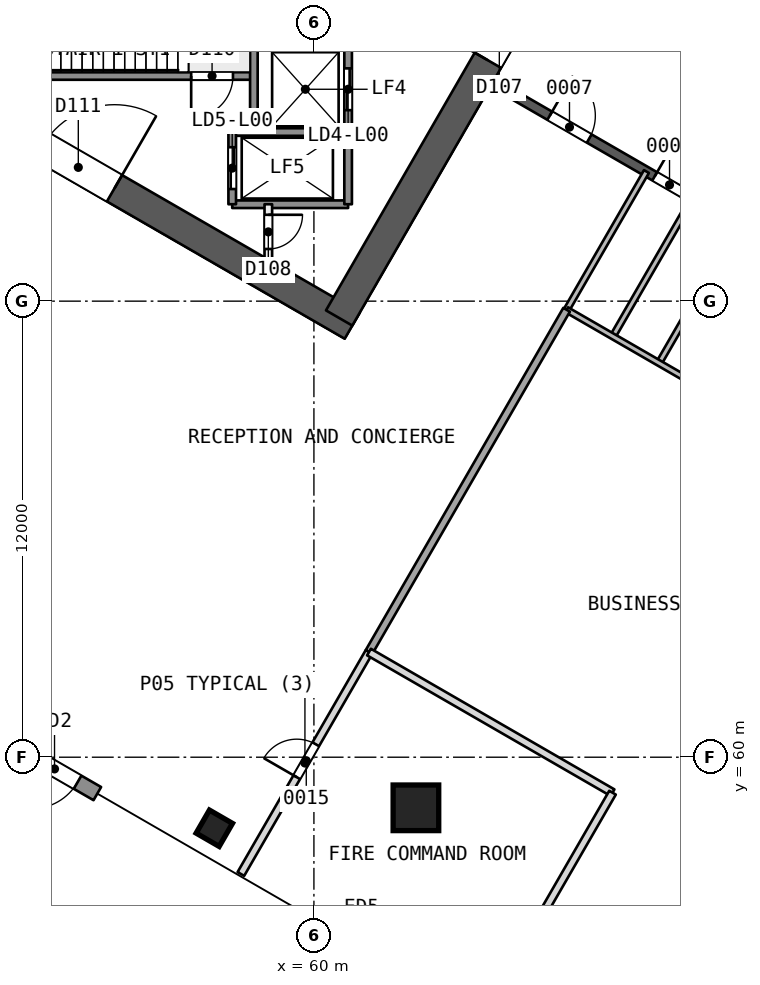
"""IFC4 building model, lengths in metres.
Left out: names, types, materials, properties, quantities, classifications, styles, units other than length and angle.
Written with IfcOpenShell. Run it as: python <this file> out.ifc"""

import sys

from ifc_helpers import new_model, si_unit, direction, frame, frame_2d, origin, origin_2d, place, context, subcontext, project, spatial, rectangle, extrude, element, fill, save


model = new_model("IFC4")
c1 = context("Model", 3, precision=1e-05, world=origin(), true_north=direction((0.0, 1.0)))
c2 = subcontext(c1, "Body", "Model", "MODEL_VIEW")
j1 = project(units=[si_unit("LENGTHUNIT", "METRE"), si_unit("PLANEANGLEUNIT", "RADIAN")], contexts=[c1])
p1 = place(None, origin())
s1 = spatial("IfcSite", under=j1, at=p1, CompositionType="ELEMENT")
p2 = place(p1, origin())
s2 = spatial("IfcBuilding", under=s1, at=p2, CompositionType="ELEMENT")
p3 = place(p2, origin())
s3 = spatial("IfcBuildingStorey", under=s2, at=p3, CompositionType="ELEMENT", Elevation=0.0)
p4 = place(p3, frame((48.797, 78.408, 0.0), z_axis=(0.0, 0.0, 1.0), x_axis=(0.866032504327, -0.499987701298, 0.0)))
e1 = element("IfcWall", 1, at=p4, inside=s3, PredefinedType="SHEAR", context=c2, shape_type="SweptSolid", body=[
    extrude(rectangle(XDim=14.102, YDim=0.8, at=frame_2d((7.051, 0.0))), origin(), (0.0, 0.0, 1.0), 9.0),
])
p5 = place(p4, frame((4.677, 0.0, 0.0)))
e2 = element("IfcOpeningElement", 2, at=p5, cuts=e1, PredefinedType="OPENING", context=c2, shape_type="SweptSolid", body=[
    extrude(rectangle(XDim=2.2, YDim=2.1, at=frame_2d((1.1, 1.05))), frame((0.0, 0.411, 0.0), z_axis=(0.0, -1.0, 0.0), x_axis=(1.0, 0.0, 0.0)), (0.0, 0.0, 1.0), 0.821),
])
p6 = place(p3, frame((60.664, 71.557, 0.0), z_axis=(0.0, 0.0, 1.0), x_axis=(0.50000409368, 0.866023040284, 0.0)))
e3 = element("IfcWall", 3, at=p6, inside=s3, PredefinedType="SHEAR", context=c2, shape_type="SweptSolid", body=[
    extrude(rectangle(XDim=9.98, YDim=0.8, at=frame_2d((4.99, 0.0))), origin(), (0.0, 0.0, 1.0), 9.0),
])
p7 = place(p6, frame((7.83, 0.0, 0.0)))
e4 = element("IfcOpeningElement", 4, at=p7, cuts=e3, PredefinedType="OPENING", context=c2, shape_type="SweptSolid", body=[
    extrude(rectangle(XDim=1.2, YDim=2.1, at=frame_2d((0.6, 1.05))), frame((0.0, 0.411, 0.0), z_axis=(0.0, -1.0, 0.0), x_axis=(1.0, 0.0, 0.0)), (0.0, 0.0, 1.0), 0.821),
])
p8 = place(p3, frame((64.7, 77.748, 0.0), z_axis=(0.0, 0.0, 1.0), x_axis=(0.866026492143, -0.499998114903, 0.0)))
e5 = element("IfcWall", 5, at=p8, inside=s3, PredefinedType="SHEAR", context=c2, shape_type="SweptSolid", body=[
    extrude(rectangle(XDim=15.588, YDim=0.25, at=frame_2d((7.794, 0.0))), origin(), (0.0, 0.0, 1.0), 8.6),
])
p9 = place(p8, frame((1.738, 0.0, 0.0)))
e6 = element("IfcOpeningElement", 6, at=p9, cuts=e5, PredefinedType="OPENING", context=c2, shape_type="SweptSolid", body=[
    extrude(rectangle(XDim=1.2, YDim=2.4, at=frame_2d((0.6, 1.2))), frame((0.0, 0.135, 0.0), z_axis=(0.0, -1.0, 0.0), x_axis=(1.0, 0.0, 0.0)), (0.0, 0.0, 1.0), 0.271),
])
p10 = place(p8, frame((4.928, 0.0, 0.0)))
e7 = element("IfcOpeningElement", 7, at=p10, cuts=e5, PredefinedType="OPENING", context=c2, shape_type="SweptSolid", body=[
    extrude(rectangle(XDim=0.9, YDim=2.1, at=frame_2d((0.45, 1.05))), frame((0.0, 0.135, 0.0), z_axis=(0.0, -1.0, 0.0), x_axis=(1.0, 0.0, 0.0)), (0.0, 0.0, 1.0), 0.271),
])
p11 = place(p8, frame((6.331, 0.0, 0.0)))
e8 = element("IfcOpeningElement", 8, at=p11, cuts=e5, PredefinedType="OPENING", context=c2, shape_type="SweptSolid", body=[
    extrude(rectangle(XDim=0.9, YDim=2.1, at=frame_2d((0.45, 1.05))), frame((0.0, 0.135, 0.0), z_axis=(0.0, -1.0, 0.0), x_axis=(1.0, 0.0, 0.0)), (0.0, 0.0, 1.0), 0.271),
])
p12 = place(p8, frame((7.968, 0.0, 0.0)))
e9 = element("IfcOpeningElement", 9, at=p12, cuts=e5, PredefinedType="OPENING", context=c2, shape_type="SweptSolid", body=[
    extrude(rectangle(XDim=0.9, YDim=2.1, at=frame_2d((0.45, 1.05))), frame((0.0, 0.135, 0.0), z_axis=(0.0, -1.0, 0.0), x_axis=(1.0, 0.0, 0.0)), (0.0, 0.0, 1.0), 0.271),
])
p13 = place(p8, frame((11.871, 0.0, 0.0)))
e10 = element("IfcOpeningElement", 10, at=p13, cuts=e5, PredefinedType="OPENING", context=c2, shape_type="SweptSolid", body=[
    extrude(rectangle(XDim=1.2, YDim=2.4, at=frame_2d((0.6, 1.2))), frame((0.0, 0.135, 0.0), z_axis=(0.0, -1.0, 0.0), x_axis=(1.0, 0.0, 0.0)), (0.0, 0.0, 1.0), 0.271),
])
p14 = place(p3, frame((62.672, 58.647, 0.0), z_axis=(0.010089088034, 0.017493176833, 0.999796078742), x_axis=(-0.499504740596, -0.866075754879, 0.020194081635)))
e11 = element("IfcColumn", 11, at=p14, inside=s3, PredefinedType="COLUMN", context=c2, shape_type="SweptSolid", body=[
    extrude(rectangle(XDim=1.2, YDim=1.2, at=origin_2d()), origin(), (0.0, 0.0, 1.0), 9.002),
])
p15 = place(p3, frame((57.379, 58.131, -0.4), z_axis=(0.0, 0.0, 1.0), x_axis=(0.5, 0.866025403784, 0.0)))
e12 = element("IfcColumn", 12, at=p15, inside=s3, PredefinedType="COLUMN", context=c2, shape_type="SweptSolid", body=[
    extrude(rectangle(XDim=0.7, YDim=0.7, at=origin_2d()), origin(), (0.0, 0.0, 1.0), 9.4),
])
p16 = place(p3, frame((66.65, 71.773, 0.0), z_axis=(0.0, 0.0, 1.0), x_axis=(0.500002543286, 0.866023935413, 0.0)))
e13 = element("IfcWall", 13, at=p16, inside=s3, PredefinedType="PARTITIONING", context=c2, shape_type="SweptSolid", body=[
    extrude(rectangle(XDim=4.2, YDim=0.15, at=frame_2d((2.1, 0.0))), origin(), (0.0, 0.0, 1.0), 8.6),
])
p17 = place(p3, frame((61.449, 62.767, 0.0), z_axis=(0.0, 0.0, 1.0), x_axis=(0.499999493275, 0.866025696342, 0.0)))
e14 = element("IfcWall", 14, at=p17, inside=s3, PredefinedType="PARTITIONING", context=c2, shape_type="SweptSolid", body=[
    extrude(rectangle(XDim=10.4, YDim=0.2, at=frame_2d((5.2, 0.0))), origin(), (0.0, 0.0, 1.0), 8.6),
])
p18 = place(p3, frame((58.078, 56.928, 0.0), z_axis=(0.0, 0.0, 1.0), x_axis=(0.500002470373, 0.866023977509, 0.0)))
e15 = element("IfcWall", 15, at=p18, inside=s3, PredefinedType="PARTITIONING", context=c2, shape_type="SweptSolid", body=[
    extrude(rectangle(XDim=6.742, YDim=0.2, at=frame_2d((3.371, 0.0))), origin(), (0.0, 0.0, 1.0), 8.6),
])
p19 = place(p18, frame((2.941, 0.0, 0.0)))
e16 = element("IfcOpeningElement", 16, at=p19, cuts=e15, PredefinedType="OPENING", context=c2, shape_type="SweptSolid", body=[
    extrude(rectangle(XDim=1.0, YDim=2.1, at=frame_2d((0.5, 1.05))), frame((0.0, 0.11, 0.0), z_axis=(0.0, -1.0, 0.0), x_axis=(1.0, 0.0, 0.0)), (0.0, 0.0, 1.0), 0.221),
])
for number, where, z_axis, x_axis in (
    (17, (67.865, 71.071, 0.0), (0.0, 0.0, 1.0), (0.5, 0.866, 0.0)),
    (18, (69.08, 70.37, 0.0), (0.0, 0.0, 1.0), (0.5, 0.866, 0.0)),
):
    element("IfcWall", number, at=place(p3, frame(where, z_axis=z_axis, x_axis=x_axis)), inside=s3, PredefinedType="PARTITIONING", context=c2, shape_type="SweptSolid", body=[
        extrude(rectangle(XDim=4.2, YDim=0.15, at=frame_2d((2.1, 0.0))), origin(), (0.0, 0.0, 1.0), 8.6),
    ])
p20 = place(p3, frame((66.65, 71.774, 0.0), z_axis=(0.0, 0.0, 1.0), x_axis=(0.866017799667, -0.500013170487, 0.0)))
e19 = element("IfcWall", 19, at=p20, inside=s3, PredefinedType="PARTITIONING", context=c2, shape_type="SweptSolid", body=[
    extrude(rectangle(XDim=4.677, YDim=0.15, at=frame_2d((2.338, 0.0))), origin(), (0.0, 0.0, 1.0), 8.6),
])
p21 = place(p3, frame((61.449, 62.767, 0.0), z_axis=(0.0, 0.0, 1.0), x_axis=(0.866023506795, -0.500003285667, 0.0)))
e20 = element("IfcWall", 20, at=p21, inside=s3, PredefinedType="PARTITIONING", context=c2, shape_type="SweptSolid", body=[
    extrude(rectangle(XDim=7.4, YDim=0.2, at=frame_2d((3.7, 0.0))), origin(), (0.0, 0.0, 1.0), 8.6),
])
p22 = place(p3, frame((67.858, 59.067, 0.0), z_axis=(0.0, 0.0, 1.0), x_axis=(-0.499993511887, -0.866029149666, 0.0)))
e21 = element("IfcWall", 21, at=p22, inside=s3, PredefinedType="PARTITIONING", context=c2, shape_type="SweptSolid", body=[
    extrude(rectangle(XDim=6.601, YDim=0.2, at=frame_2d((3.301, 0.0))), origin(), (0.0, 0.0, 1.0), 8.6),
])
p23 = place(p3, frame((54.3, 59.042, 0.0), z_axis=(0.0, 0.0, 1.0), x_axis=(-0.866020516738, 0.500008464518, 0.0)))
e22 = element("IfcWall", 22, at=p23, inside=s3, PredefinedType="SOLIDWALL", context=c2, shape_type="SweptSolid", body=[
    extrude(rectangle(XDim=10.172, YDim=0.4, at=frame_2d((5.086, 0.0))), origin(), (0.0, 0.0, 1.0), 8.6),
])
p24 = place(p23, frame((7.772, 0.0, 0.0)))
e23 = element("IfcOpeningElement", 23, at=p24, cuts=e22, PredefinedType="OPENING", context=c2, shape_type="SweptSolid", body=[
    extrude(rectangle(XDim=1.8, YDim=2.4, at=frame_2d((0.9, 1.2))), frame((0.0, 0.21, 0.0), z_axis=(0.0, -1.0, 0.0), x_axis=(1.0, 0.0, 0.0)), (0.0, 0.0, 1.0), 0.421),
])
p25 = place(p23, frame((0.6, 0.0, 0.0)))
e24 = element("IfcOpeningElement", 24, at=p25, cuts=e22, PredefinedType="OPENING", context=c2, shape_type="SweptSolid", body=[
    extrude(rectangle(XDim=1.4, YDim=2.4, at=frame_2d((0.7, 1.2))), frame((0.0, 0.21, 0.0), z_axis=(0.0, -1.0, 0.0), x_axis=(1.0, 0.0, 0.0)), (0.0, 0.0, 1.0), 0.421),
])
p26 = place(p3, frame((58.42, 77.925, 0.0), z_axis=(0.0, 0.0, 1.0), x_axis=(-1.0, 0.0, 0.0)))
e25 = element("IfcWall", 25, at=p26, inside=s3, PredefinedType="SOLIDWALL", context=c2, shape_type="SweptSolid", body=[
    extrude(rectangle(XDim=7.7, YDim=0.2, at=frame_2d((3.85, 0.0))), origin(), (0.0, 0.0, 1.0), 8.6),
])
p27 = place(p26, frame((0.55, 0.0, 0.0)))
e26 = element("IfcOpeningElement", 26, at=p27, cuts=e25, PredefinedType="OPENING", context=c2, shape_type="SweptSolid", body=[
    extrude(rectangle(XDim=1.1, YDim=2.1, at=frame_2d((0.55, 1.05))), frame((0.0, 0.11, 0.0), z_axis=(0.0, -1.0, 0.0), x_axis=(1.0, 0.0, 0.0)), (0.0, 0.0, 1.0), 0.221),
])
for number, where, z_axis, x_axis in (
    (27, (60.9, 76.45, 0.0), (0.0, 0.0, 1.0), (-1.0, 0.0, 0.0)),
    (28, (60.9, 74.55, 0.0), (0.0, 0.0, 1.0), (-1.0, 0.0, 0.0)),
):
    element("IfcWall", number, at=place(p3, frame(where, z_axis=z_axis, x_axis=x_axis)), inside=s3, PredefinedType="SOLIDWALL", context=c2, shape_type="SweptSolid", body=[
        extrude(rectangle(XDim=3.05, YDim=0.2, at=frame_2d((1.525, 0.0))), origin(), (0.0, 0.0, 1.0), 8.6),
    ])
p28 = place(p3, frame((60.9, 85.45, 0.0), z_axis=(0.0, 0.0, 1.0), x_axis=(0.0, -1.0, 0.0)))
e29 = element("IfcWall", 29, at=p28, inside=s3, PredefinedType="SOLIDWALL", context=c2, shape_type="SweptSolid", body=[
    extrude(rectangle(XDim=10.9, YDim=0.2, at=frame_2d((5.45, 0.0))), origin(), (0.0, 0.0, 1.0), 8.6),
])
p29 = place(p28, frame((0.575, 0.0, 0.0)))
e30 = element("IfcOpeningElement", 30, at=p29, cuts=e29, PredefinedType="OPENING", context=c2, shape_type="SweptSolid", body=[
    extrude(rectangle(XDim=1.1, YDim=2.1, at=frame_2d((0.55, 1.05))), frame((0.0, 0.11, 0.0), z_axis=(0.0, -1.0, 0.0), x_axis=(1.0, 0.0, 0.0)), (0.0, 0.0, 1.0), 0.221),
])
p30 = place(p28, frame((2.825, 0.0, 0.0)))
e31 = element("IfcOpeningElement", 31, at=p30, cuts=e29, PredefinedType="OPENING", context=c2, shape_type="SweptSolid", body=[
    extrude(rectangle(XDim=1.1, YDim=2.1, at=frame_2d((0.55, 1.05))), frame((0.0, 0.11, 0.0), z_axis=(0.0, -1.0, 0.0), x_axis=(1.0, 0.0, 0.0)), (0.0, 0.0, 1.0), 0.221),
])
p31 = place(p28, frame((5.075, 0.0, 0.0)))
e32 = element("IfcOpeningElement", 32, at=p31, cuts=e29, PredefinedType="OPENING", context=c2, shape_type="SweptSolid", body=[
    extrude(rectangle(XDim=1.1, YDim=2.1, at=frame_2d((0.55, 1.05))), frame((0.0, 0.11, 0.0), z_axis=(0.0, -1.0, 0.0), x_axis=(1.0, 0.0, 0.0)), (0.0, 0.0, 1.0), 0.221),
])
p32 = place(p28, frame((7.325, 0.0, 0.0)))
e33 = element("IfcOpeningElement", 33, at=p32, cuts=e29, PredefinedType="OPENING", context=c2, shape_type="SweptSolid", body=[
    extrude(rectangle(XDim=1.1, YDim=2.1, at=frame_2d((0.55, 1.05))), frame((0.0, 0.11, 0.0), z_axis=(0.0, -1.0, 0.0), x_axis=(1.0, 0.0, 0.0)), (0.0, 0.0, 1.0), 0.221),
])
p33 = place(p3, frame((58.8, 74.55, 0.0), z_axis=(0.0, 0.0, 1.0), x_axis=(0.0, -1.0, 0.0)))
e34 = element("IfcWall", 34, at=p33, inside=s3, PredefinedType="PARTITIONING", context=c2, shape_type="SweptSolid", body=[
    extrude(rectangle(XDim=1.455, YDim=0.2, at=frame_2d((0.728, 0.0))), origin(), (0.0, 0.0, 1.0), 8.6),
])
p34 = place(p33, frame((0.278, 0.0, 0.0)))
e35 = element("IfcOpeningElement", 35, at=p34, cuts=e34, PredefinedType="OPENING", context=c2, shape_type="SweptSolid", body=[
    extrude(rectangle(XDim=0.9, YDim=2.1, at=frame_2d((0.45, 1.05))), frame((0.0, 0.11, 0.0), z_axis=(0.0, -1.0, 0.0), x_axis=(1.0, 0.0, 0.0)), (0.0, 0.0, 1.0), 0.221),
])
p35 = place(p3, frame((58.42, 85.45, 0.0), z_axis=(0.0, 0.0, 1.0), x_axis=(0.0, -1.0, 0.0)))
e36 = element("IfcWall", 36, at=p35, inside=s3, PredefinedType="SOLIDWALL", context=c2, shape_type="SweptSolid", body=[
    extrude(rectangle(XDim=9.0, YDim=0.2, at=frame_2d((4.5, 0.0))), origin(), (0.0, 0.0, 1.0), 8.6),
])
p36 = place(p3, frame((57.85, 76.45, 0.0), z_axis=(0.0, 0.0, 1.0), x_axis=(0.0, -1.0, 0.0)))
e37 = element("IfcWall", 37, at=p36, inside=s3, PredefinedType="SOLIDWALL", context=c2, shape_type="SweptSolid", body=[
    extrude(rectangle(XDim=1.9, YDim=0.2, at=frame_2d((0.95, 0.0))), origin(), (0.0, 0.0, 1.0), 8.6),
])
p37 = place(p36, frame((0.4, 0.0, 0.0)))
e38 = element("IfcOpeningElement", 38, at=p37, cuts=e37, PredefinedType="OPENING", context=c2, shape_type="SweptSolid", body=[
    extrude(rectangle(XDim=1.1, YDim=2.1, at=frame_2d((0.55, 1.05))), frame((0.0, 0.11, 0.0), z_axis=(0.0, -1.0, 0.0), x_axis=(1.0, 0.0, 0.0)), (0.0, 0.0, 1.0), 0.221),
])
p38 = place(p9, origin())
e39 = element("IfcDoor", 39, at=p38, inside=s3, OperationType="SINGLE_SWING_LEFT", PredefinedType="NOTDEFINED", context=c2, shape_type="SweptSolid", body=[
    extrude(rectangle(XDim=1.2, YDim=2.4, at=frame_2d((0.6, 1.2))), frame((0.0, 0.025, 0.0), z_axis=(0.0, -1.0, 0.0), x_axis=(1.0, 0.0, 0.0)), (0.0, 0.0, 1.0), 0.05),
])
fill(e6, e39)
p39 = place(p10, origin())
e40 = element("IfcDoor", 40, at=p39, inside=s3, OperationType="SINGLE_SWING_LEFT", PredefinedType="NOTDEFINED", context=c2, shape_type="SweptSolid", body=[
    extrude(rectangle(XDim=0.9, YDim=2.1, at=frame_2d((0.45, 1.05))), frame((0.0, 0.025, 0.0), z_axis=(0.0, -1.0, 0.0), x_axis=(1.0, 0.0, 0.0)), (0.0, 0.0, 1.0), 0.05),
])
fill(e7, e40)
p40 = place(p19, origin())
e41 = element("IfcDoor", 41, at=p40, inside=s3, OperationType="SINGLE_SWING_LEFT", PredefinedType="NOTDEFINED", context=c2, shape_type="SweptSolid", body=[
    extrude(rectangle(XDim=1.0, YDim=2.1, at=frame_2d((0.5, 1.05))), frame((0.0, 0.025, 0.0), z_axis=(0.0, -1.0, 0.0), x_axis=(1.0, 0.0, 0.0)), (0.0, 0.0, 1.0), 0.05),
])
fill(e16, e41)
p41 = place(p25, origin())
e42 = element("IfcDoor", 42, at=p41, inside=s3, OperationType="SINGLE_SWING_RIGHT", PredefinedType="NOTDEFINED", context=c2, shape_type="SweptSolid", body=[
    extrude(rectangle(XDim=1.4, YDim=2.4, at=frame_2d((0.7, 1.2))), frame((0.0, 0.025, 0.0), z_axis=(0.0, -1.0, 0.0), x_axis=(1.0, 0.0, 0.0)), (0.0, 0.0, 1.0), 0.05),
])
fill(e24, e42)
p42 = place(p7, origin())
e43 = element("IfcDoor", 43, at=p42, inside=s3, OperationType="SINGLE_SWING_LEFT", PredefinedType="NOTDEFINED", context=c2, shape_type="SweptSolid", body=[
    extrude(rectangle(XDim=1.2, YDim=2.1, at=frame_2d((0.6, 1.05))), frame((0.0, 0.025, 0.0), z_axis=(0.0, -1.0, 0.0), x_axis=(1.0, 0.0, 0.0)), (0.0, 0.0, 1.0), 0.05),
])
fill(e4, e43)
p43 = place(p32, origin())
e44 = element("IfcDoor", 44, at=p43, inside=s3, OperationType="SLIDING_TO_LEFT", PredefinedType="NOTDEFINED", context=c2, shape_type="SweptSolid", body=[
    extrude(rectangle(XDim=1.1, YDim=2.1, at=frame_2d((0.55, 1.05))), frame((0.0, 0.025, 0.0), z_axis=(0.0, -1.0, 0.0), x_axis=(1.0, 0.0, 0.0)), (0.0, 0.0, 1.0), 0.05),
])
fill(e33, e44)
p44 = place(p37, origin())
e45 = element("IfcDoor", 45, at=p44, inside=s3, OperationType="SLIDING_TO_RIGHT", PredefinedType="NOTDEFINED", context=c2, shape_type="SweptSolid", body=[
    extrude(rectangle(XDim=1.1, YDim=2.1, at=frame_2d((0.55, 1.05))), frame((0.0, 0.025, 0.0), z_axis=(0.0, -1.0, 0.0), x_axis=(1.0, 0.0, 0.0)), (0.0, 0.0, 1.0), 0.05),
])
fill(e38, e45)
p45 = place(p34, origin())
e46 = element("IfcDoor", 46, at=p45, inside=s3, OperationType="SINGLE_SWING_LEFT", PredefinedType="NOTDEFINED", context=c2, shape_type="SweptSolid", body=[
    extrude(rectangle(XDim=0.9, YDim=2.1, at=frame_2d((0.45, 1.05))), frame((0.0, 0.025, 0.0), z_axis=(0.0, -1.0, 0.0), x_axis=(1.0, 0.0, 0.0)), (0.0, 0.0, 1.0), 0.05),
])
fill(e35, e46)
p46 = place(p27, origin())
e47 = element("IfcDoor", 47, at=p46, inside=s3, OperationType="SINGLE_SWING_RIGHT", PredefinedType="NOTDEFINED", context=c2, shape_type="SweptSolid", body=[
    extrude(rectangle(XDim=1.1, YDim=2.1, at=frame_2d((0.55, 1.05))), frame((0.0, 0.025, 0.0), z_axis=(0.0, -1.0, 0.0), x_axis=(1.0, 0.0, 0.0)), (0.0, 0.0, 1.0), 0.05),
])
fill(e26, e47)
p47 = place(p5, origin())
e48 = element("IfcDoor", 48, at=p47, inside=s3, OperationType="SINGLE_SWING_RIGHT", PredefinedType="NOTDEFINED", context=c2, shape_type="SweptSolid", body=[
    extrude(rectangle(XDim=2.2, YDim=2.1, at=frame_2d((1.1, 1.05))), frame((0.0, 0.025, 0.0), z_axis=(0.0, -1.0, 0.0), x_axis=(1.0, 0.0, 0.0)), (0.0, 0.0, 1.0), 0.05),
])
fill(e2, e48)
save(model, sys.argv[1])
